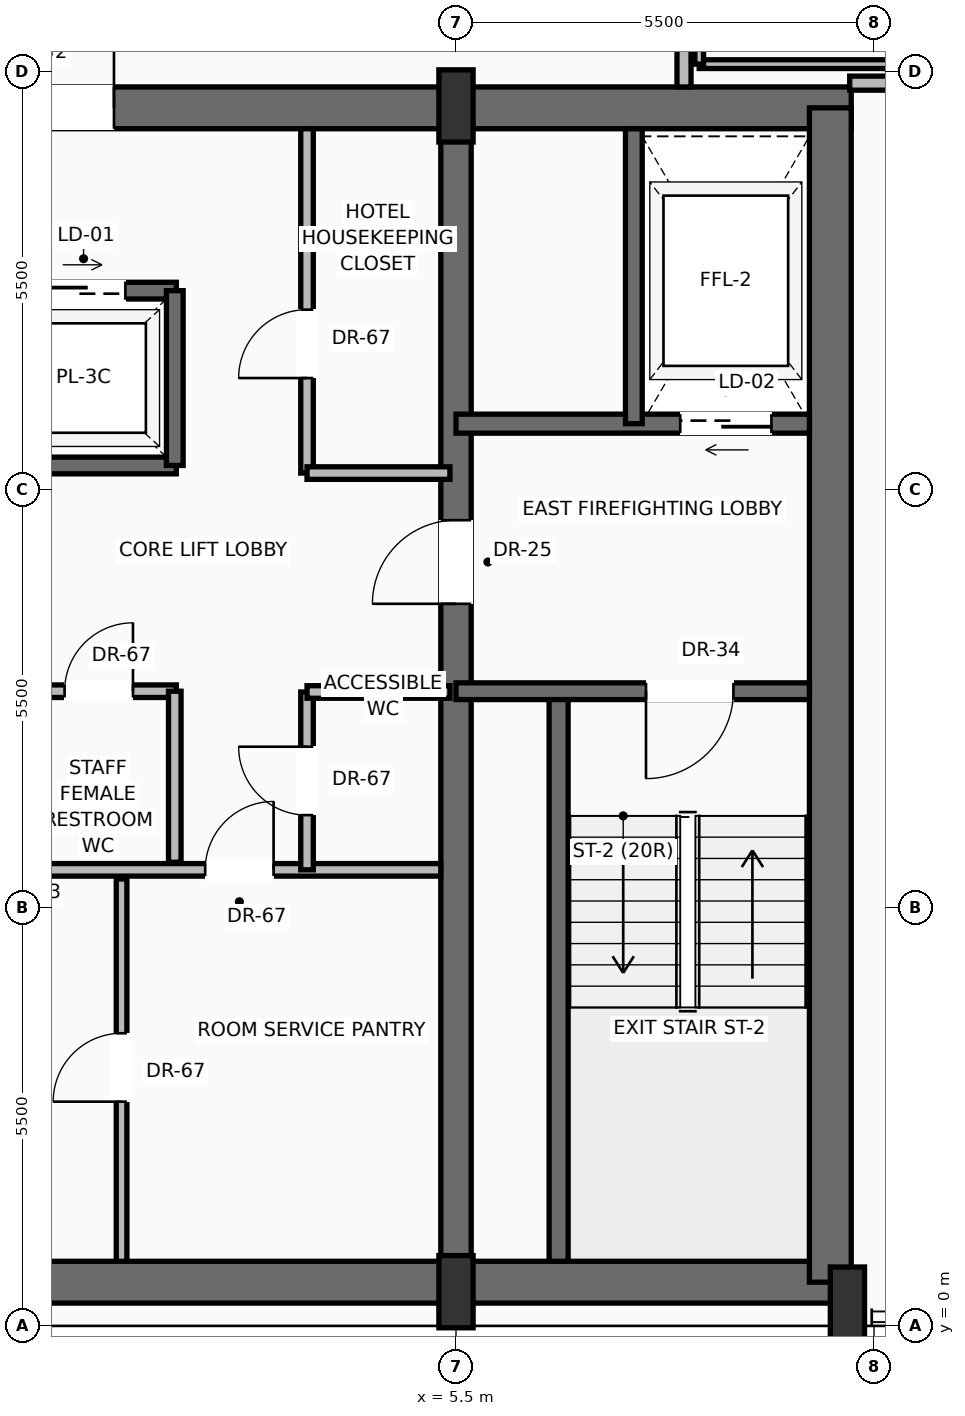
"""IFC4 building model, lengths in metres.
Left out: names, types, materials, properties, quantities, classifications, styles, units other than length and angle.
Written with IfcOpenShell. Run it as: python <this file> out.ifc"""

import sys

from ifc_helpers import new_model, si_unit, direction, frame, frame_2d, origin, origin_2d, place, context, subcontext, project, spatial, rectangle, extrude, source, transform, mapped, element, fill, save


model = new_model("IFC4")
c1 = context("Model", 3, precision=1e-05, world=origin(), true_north=direction((0.0, 1.0)))
c2 = subcontext(c1, "Body", "Model", "MODEL_VIEW")
j1 = project(units=[si_unit("LENGTHUNIT", "METRE"), si_unit("PLANEANGLEUNIT", "RADIAN")], contexts=[c1])
p1 = place(None, origin())
s1 = spatial("IfcSite", under=j1, at=p1, CompositionType="ELEMENT")
p2 = place(p1, origin())
s2 = spatial("IfcBuilding", under=s1, at=p2, CompositionType="ELEMENT")
p3 = place(p2, frame((0.0, 0.0, 223.45)))
s3 = spatial("IfcBuildingStorey", under=s2, at=p3, CompositionType="ELEMENT", Elevation=223.45)
p4 = place(p3, frame((-10.65, 0.575, 0.0), z_axis=(0.0, 0.0, 1.0), x_axis=(1.0, 0.0, 0.0)))
e1 = element("IfcWall", 1, at=p4, inside=s3, PredefinedType="SHEAR", context=c2, shape_type="SweptSolid", body=[
    extrude(rectangle(XDim=21.3, YDim=0.55, at=frame_2d((10.65, 0.0))), origin(), (0.0, 0.0, 1.0), 3.24),
])
p5 = place(p3, frame((-10.7, 16.025, 0.0), z_axis=(0.0, 0.0, 1.0), x_axis=(1.0, 0.0, 0.0)))
e2 = element("IfcWall", 2, at=p5, inside=s3, PredefinedType="SHEAR", context=c2, shape_type="SweptSolid", body=[
    extrude(rectangle(XDim=21.4, YDim=0.55, at=frame_2d((10.7, 0.0))), origin(), (0.0, 0.0, 1.0), 3.24),
])
p6 = place(p5, frame((3.27, 0.0, 0.0)))
e3 = element("IfcOpeningElement", 3, at=p6, cuts=e2, PredefinedType="OPENING", context=c2, shape_type="SweptSolid", body=[
    extrude(rectangle(XDim=1.3, YDim=2.3, at=frame_2d((0.65, 1.15))), frame((0.0, 0.285, 0.0), z_axis=(0.0, -1.0, 0.0), x_axis=(1.0, 0.0, 0.0)), (0.0, 0.0, 1.0), 0.57),
])
p7 = place(p5, frame((9.7, 0.0, 0.0)))
e4 = element("IfcOpeningElement", 4, at=p7, cuts=e2, PredefinedType="OPENING", context=c2, shape_type="SweptSolid", body=[
    extrude(rectangle(XDim=2.0, YDim=2.4, at=frame_2d((1.0, 1.2))), frame((0.0, 0.285, 0.0), z_axis=(0.0, -1.0, 0.0), x_axis=(1.0, 0.0, 0.0)), (0.0, 0.0, 1.0), 0.57),
])
p8 = place(p3, frame((10.425, 0.575, 0.0), z_axis=(0.0, 0.0, 1.0), x_axis=(0.0, 1.0, 0.0)))
e5 = element("IfcWall", 5, at=p8, inside=s3, PredefinedType="SHEAR", context=c2, shape_type="SweptSolid", body=[
    extrude(rectangle(XDim=15.45, YDim=0.55, at=frame_2d((7.725, 0.0))), origin(), (0.0, 0.0, 1.0), 3.24),
])
p9 = place(p3, frame((5.5, 0.575, 0.0), z_axis=(0.0, 0.0, 1.0), x_axis=(0.0, 1.0, 0.0)))
e6 = element("IfcWall", 6, at=p9, inside=s3, PredefinedType="SHEAR", context=c2, shape_type="SweptSolid", body=[
    extrude(rectangle(XDim=15.45, YDim=0.4, at=frame_2d((7.725, 0.0))), origin(), (0.0, 0.0, 1.0), 3.24),
])
p10 = place(p9, frame((8.925, 0.0, 0.0)))
e7 = element("IfcOpeningElement", 7, at=p10, cuts=e6, PredefinedType="OPENING", context=c2, shape_type="SweptSolid", body=[
    extrude(rectangle(XDim=1.1, YDim=2.2, at=frame_2d((0.55, 1.1))), frame((0.0, 0.21, 0.0), z_axis=(0.0, -1.0, 0.0), x_axis=(1.0, 0.0, 0.0)), (0.0, 0.0, 1.0), 0.42),
])
m1 = source(origin(), c2, "Body", "SweptSolid", [
    extrude(rectangle(XDim=0.45, YDim=0.95, at=origin_2d()), origin(), (0.0, 0.0, 1.0), 3.45),
])
for number, where, z_axis, x_axis in (
    (8, (5.5, 0.45, 0.0), (0.0, 0.0, 1.0), (1.0, 0.0, 0.0)),
    (9, (10.65, 0.3, 0.0), (0.0, 0.0, 1.0), (1.0, 0.0, 0.0)),
    (10, (5.5, 16.05, 0.0), (0.0, 0.0, 1.0), (1.0, 0.0, 0.0)),
):
    element("IfcColumn", number, at=place(p3, frame(where, z_axis=z_axis, x_axis=x_axis)), inside=s3, PredefinedType="PILASTER", context=c2, shape_type="MappedRepresentation", body=[
        mapped(m1, transform((0.0, 0.0, 0.0), scale=1.0)),
    ])
p11 = place(p3, frame((8.883, 32.178, 0.0), z_axis=(0.0, 0.0, 1.0), x_axis=(0.529719957473, -0.848172604282, 0.0)))
e11 = element("IfcWall", 11, at=p11, inside=s3, PredefinedType="SOLIDWALL", context=c2, shape_type="SweptSolid", body=[
    extrude(rectangle(XDim=19.431, YDim=0.28, at=frame_2d((9.716, 0.0))), origin(), (0.0, 0.0, 1.0), 2.82),
])
p12 = place(p11, frame((4.664, 0.0, 0.0)))
e12 = element("IfcOpeningElement", 12, at=p12, cuts=e11, PredefinedType="OPENING", context=c2, shape_type="SweptSolid", body=[
    extrude(rectangle(XDim=1.6, YDim=2.35, at=frame_2d((0.8, 1.175))), frame((0.0, 0.15, 0.0), z_axis=(0.0, -1.0, 0.0), x_axis=(1.0, 0.0, 0.0)), (0.0, 0.0, 1.0), 0.3),
])
p13 = place(p11, frame((13.213, 0.0, 0.9)))
e13 = element("IfcOpeningElement", 13, at=p13, cuts=e11, PredefinedType="OPENING", context=c2, shape_type="SweptSolid", body=[
    extrude(rectangle(XDim=1.55, YDim=1.75, at=frame_2d((0.775, 0.875))), frame((0.0, 0.15, 0.0), z_axis=(0.0, -1.0, 0.0), x_axis=(1.0, 0.0, 0.0)), (0.0, 0.0, 1.0), 0.3),
])
p14 = place(p3, frame((6.85, 0.85, 0.0), z_axis=(0.0, 0.0, 1.0), x_axis=(0.0, 1.0, 0.0)))
e14 = element("IfcWall", 14, at=p14, inside=s3, PredefinedType="SOLIDWALL", context=c2, shape_type="SweptSolid", body=[
    extrude(rectangle(XDim=7.5, YDim=0.25, at=frame_2d((3.75, 0.0))), origin(), (0.0, 0.0, 1.0), 3.24),
])
p15 = place(p3, frame((10.15, 8.35, 0.0), z_axis=(0.0, 0.0, 1.0), x_axis=(-1.0, 0.0, 0.0)))
e15 = element("IfcWall", 15, at=p15, inside=s3, PredefinedType="SOLIDWALL", context=c2, shape_type="SweptSolid", body=[
    extrude(rectangle(XDim=4.65, YDim=0.22, at=frame_2d((2.325, 0.0))), origin(), (0.0, 0.0, 1.0), 3.24),
])
p16 = place(p15, frame((1.0, 0.0, 0.0)))
e16 = element("IfcOpeningElement", 16, at=p16, cuts=e15, PredefinedType="OPENING", context=c2, shape_type="SweptSolid", body=[
    extrude(rectangle(XDim=1.15, YDim=2.2, at=frame_2d((0.575, 1.1))), frame((0.0, 0.12, 0.0), z_axis=(0.0, -1.0, 0.0), x_axis=(1.0, 0.0, 0.0)), (0.0, 0.0, 1.0), 0.24),
])
p17 = place(p3, frame((10.15, 11.87, 0.0), z_axis=(0.0, 0.0, 1.0), x_axis=(-1.0, 0.0, 0.0)))
e17 = element("IfcWall", 17, at=p17, inside=s3, PredefinedType="SOLIDWALL", context=c2, shape_type="SweptSolid", body=[
    extrude(rectangle(XDim=4.65, YDim=0.25, at=frame_2d((2.325, 0.0))), origin(), (0.0, 0.0, 1.0), 3.24),
])
p18 = place(p17, frame((0.5, 0.0, 0.0)))
e18 = element("IfcOpeningElement", 18, at=p18, cuts=e17, PredefinedType="OPENING", context=c2, shape_type="SweptSolid", body=[
    extrude(rectangle(XDim=1.2, YDim=2.25, at=frame_2d((0.6, 1.125))), frame((0.0, 0.135, 0.0), z_axis=(0.0, -1.0, 0.0), x_axis=(1.0, 0.0, 0.0)), (0.0, 0.0, 1.0), 0.27),
])
p19 = place(p3, frame((7.84, 11.87, 0.0), z_axis=(0.0, 0.0, 1.0), x_axis=(0.0, 1.0, 0.0)))
e19 = element("IfcWall", 19, at=p19, inside=s3, PredefinedType="SOLIDWALL", context=c2, shape_type="SweptSolid", body=[
    extrude(rectangle(XDim=3.88, YDim=0.22, at=frame_2d((1.94, 0.0))), origin(), (0.0, 0.0, 1.0), 3.24),
])
p20 = place(p3, frame((-5.5, 6.0, 0.0), z_axis=(0.0, 0.0, 1.0), x_axis=(1.0, 0.0, 0.0)))
e20 = element("IfcWall", 20, at=p20, inside=s3, PredefinedType="PARTITIONING", context=c2, shape_type="SweptSolid", body=[
    extrude(rectangle(XDim=10.8, YDim=0.165, at=frame_2d((5.4, 0.0))), origin(), (0.0, 0.0, 1.0), 3.232),
])
p21 = place(p20, frame((7.7, 0.0, 0.0)))
e21 = element("IfcOpeningElement", 21, at=p21, cuts=e20, PredefinedType="OPENING", context=c2, shape_type="SweptSolid", body=[
    extrude(rectangle(XDim=0.9, YDim=2.1, at=frame_2d((0.45, 1.05))), frame((0.0, 0.093, 0.0), z_axis=(0.0, -1.0, 0.0), x_axis=(1.0, 0.0, 0.0)), (0.0, 0.0, 1.0), 0.185),
])
p22 = place(p3, frame((1.1, 0.85, 0.0), z_axis=(0.0, 0.0, 1.0), x_axis=(0.0, 1.0, 0.0)))
e22 = element("IfcWall", 22, at=p22, inside=s3, PredefinedType="PARTITIONING", context=c2, shape_type="SweptSolid", body=[
    extrude(rectangle(XDim=5.03, YDim=0.14, at=frame_2d((2.515, 0.0))), origin(), (0.0, 0.0, 1.0), 3.232),
])
p23 = place(p22, frame((2.1, 0.0, 0.0)))
e23 = element("IfcOpeningElement", 23, at=p23, cuts=e22, PredefinedType="OPENING", context=c2, shape_type="SweptSolid", body=[
    extrude(rectangle(XDim=0.9, YDim=2.1, at=frame_2d((0.45, 1.05))), frame((0.0, 0.08, 0.0), z_axis=(0.0, -1.0, 0.0), x_axis=(1.0, 0.0, 0.0)), (0.0, 0.0, 1.0), 0.16),
])
p24 = place(p3, frame((3.54, 6.0, 0.0), z_axis=(0.0, 0.0, 1.0), x_axis=(0.0, 1.0, 0.0)))
e24 = element("IfcWall", 24, at=p24, inside=s3, PredefinedType="PARTITIONING", context=c2, shape_type="SweptSolid", body=[
    extrude(rectangle(XDim=2.34, YDim=0.165, at=frame_2d((1.17, 0.0))), origin(), (0.0, 0.0, 1.0), 3.232),
])
p25 = place(p24, frame((0.72, 0.0, 0.0)))
e25 = element("IfcOpeningElement", 25, at=p25, cuts=e24, PredefinedType="OPENING", context=c2, shape_type="SweptSolid", body=[
    extrude(rectangle(XDim=0.9, YDim=2.1, at=frame_2d((0.45, 1.05))), frame((0.0, 0.093, 0.0), z_axis=(0.0, -1.0, 0.0), x_axis=(1.0, 0.0, 0.0)), (0.0, 0.0, 1.0), 0.185),
])
p26 = place(p3, frame((3.54, 8.34, 0.0), z_axis=(0.0, 0.0, 1.0), x_axis=(1.0, 0.0, 0.0)))
e26 = element("IfcWall", 26, at=p26, inside=s3, PredefinedType="PARTITIONING", context=c2, shape_type="SweptSolid", body=[
    extrude(rectangle(XDim=1.88, YDim=0.165, at=frame_2d((0.94, 0.0))), origin(), (0.0, 0.0, 1.0), 3.232),
])
p27 = place(p3, frame((-5.3, 8.35, 0.0), z_axis=(0.0, 0.0, 1.0), x_axis=(1.0, 0.0, 0.0)))
e27 = element("IfcWall", 27, at=p27, inside=s3, PredefinedType="PARTITIONING", context=c2, shape_type="SweptSolid", body=[
    extrude(rectangle(XDim=7.12, YDim=0.165, at=frame_2d((3.56, 0.0))), origin(), (0.0, 0.0, 1.0), 3.232),
])
p28 = place(p27, frame((0.85, 0.0, 0.0)))
e28 = element("IfcOpeningElement", 28, at=p28, cuts=e27, PredefinedType="OPENING", context=c2, shape_type="SweptSolid", body=[
    extrude(rectangle(XDim=0.9, YDim=2.1, at=frame_2d((0.45, 1.05))), frame((0.0, 0.093, 0.0), z_axis=(0.0, -1.0, 0.0), x_axis=(1.0, 0.0, 0.0)), (0.0, 0.0, 1.0), 0.185),
])
p29 = place(p27, frame((5.65, 0.0, 0.0)))
e29 = element("IfcOpeningElement", 29, at=p29, cuts=e27, PredefinedType="OPENING", context=c2, shape_type="SweptSolid", body=[
    extrude(rectangle(XDim=0.9, YDim=2.1, at=frame_2d((0.45, 1.05))), frame((0.0, 0.093, 0.0), z_axis=(0.0, -1.0, 0.0), x_axis=(1.0, 0.0, 0.0)), (0.0, 0.0, 1.0), 0.185),
])
p30 = place(p3, frame((1.8, 6.1, 0.0), z_axis=(0.0, 0.0, 1.0), x_axis=(0.0, 1.0, 0.0)))
e30 = element("IfcWall", 30, at=p30, inside=s3, PredefinedType="PARTITIONING", context=c2, shape_type="SweptSolid", body=[
    extrude(rectangle(XDim=2.25, YDim=0.165, at=frame_2d((1.125, 0.0))), origin(), (0.0, 0.0, 1.0), 3.232),
])
p31 = place(p3, frame((-5.5, 11.32, 0.0), z_axis=(0.0, 0.0, 1.0), x_axis=(1.0, 0.0, 0.0)))
e31 = element("IfcWall", 31, at=p31, inside=s3, PredefinedType="SOLIDWALL", context=c2, shape_type="SweptSolid", body=[
    extrude(rectangle(XDim=7.32, YDim=0.22, at=frame_2d((3.66, 0.0))), origin(), (0.0, 0.0, 1.0), 3.24),
])
p32 = place(p3, frame((-5.5, 13.62, 0.0), z_axis=(0.0, 0.0, 1.0), x_axis=(1.0, 0.0, 0.0)))
e32 = element("IfcWall", 32, at=p32, inside=s3, PredefinedType="SOLIDWALL", context=c2, shape_type="SweptSolid", body=[
    extrude(rectangle(XDim=7.32, YDim=0.22, at=frame_2d((3.66, 0.0))), origin(), (0.0, 0.0, 1.0), 3.24),
])
p33 = place(p32, frame((0.75, 0.0, 0.0)))
e33 = element("IfcOpeningElement", 33, at=p33, cuts=e32, PredefinedType="OPENING", context=c2, shape_type="SweptSolid", body=[
    extrude(rectangle(XDim=1.1, YDim=2.2, at=frame_2d((0.55, 1.1))), frame((0.0, 0.12, 0.0), z_axis=(0.0, -1.0, 0.0), x_axis=(1.0, 0.0, 0.0)), (0.0, 0.0, 1.0), 0.24),
])
p34 = place(p32, frame((3.15, 0.0, 0.0)))
e34 = element("IfcOpeningElement", 34, at=p34, cuts=e32, PredefinedType="OPENING", context=c2, shape_type="SweptSolid", body=[
    extrude(rectangle(XDim=1.1, YDim=2.2, at=frame_2d((0.55, 1.1))), frame((0.0, 0.12, 0.0), z_axis=(0.0, -1.0, 0.0), x_axis=(1.0, 0.0, 0.0)), (0.0, 0.0, 1.0), 0.24),
])
p35 = place(p32, frame((5.55, 0.0, 0.0)))
e35 = element("IfcOpeningElement", 35, at=p35, cuts=e32, PredefinedType="OPENING", context=c2, shape_type="SweptSolid", body=[
    extrude(rectangle(XDim=1.1, YDim=2.2, at=frame_2d((0.55, 1.1))), frame((0.0, 0.12, 0.0), z_axis=(0.0, -1.0, 0.0), x_axis=(1.0, 0.0, 0.0)), (0.0, 0.0, 1.0), 0.24),
])
p36 = place(p3, frame((1.8, 11.32, 0.0), z_axis=(0.0, 0.0, 1.0), x_axis=(0.0, 1.0, 0.0)))
e36 = element("IfcWall", 36, at=p36, inside=s3, PredefinedType="SOLIDWALL", context=c2, shape_type="SweptSolid", body=[
    extrude(rectangle(XDim=2.3, YDim=0.22, at=frame_2d((1.15, 0.0))), origin(), (0.0, 0.0, 1.0), 3.24),
])
p37 = place(p3, frame((3.54, 11.22, 0.0), z_axis=(0.0, 0.0, 1.0), x_axis=(0.0, 1.0, 0.0)))
e37 = element("IfcWall", 37, at=p37, inside=s3, PredefinedType="PARTITIONING", context=c2, shape_type="SweptSolid", body=[
    extrude(rectangle(XDim=4.53, YDim=0.165, at=frame_2d((2.265, 0.0))), origin(), (0.0, 0.0, 1.0), 3.232),
])
p38 = place(p37, frame((1.25, 0.0, 0.0)))
e38 = element("IfcOpeningElement", 38, at=p38, cuts=e37, PredefinedType="OPENING", context=c2, shape_type="SweptSolid", body=[
    extrude(rectangle(XDim=0.9, YDim=2.1, at=frame_2d((0.45, 1.05))), frame((0.0, 0.093, 0.0), z_axis=(0.0, -1.0, 0.0), x_axis=(1.0, 0.0, 0.0)), (0.0, 0.0, 1.0), 0.185),
])
p39 = place(p3, frame((3.54, 11.22, 0.0), z_axis=(0.0, 0.0, 1.0), x_axis=(1.0, 0.0, 0.0)))
e39 = element("IfcWall", 39, at=p39, inside=s3, PredefinedType="PARTITIONING", context=c2, shape_type="SweptSolid", body=[
    extrude(rectangle(XDim=1.88, YDim=0.165, at=frame_2d((0.94, 0.0))), origin(), (0.0, 0.0, 1.0), 3.232),
])
p40 = place(p3, frame((8.5, 16.3, 0.0), z_axis=(0.0, 0.0, 1.0), x_axis=(0.0, 1.0, 0.0)))
e40 = element("IfcWall", 40, at=p40, inside=s3, PredefinedType="PARTITIONING", context=c2, shape_type="SweptSolid", body=[
    extrude(rectangle(XDim=13.3, YDim=0.185, at=frame_2d((6.65, 0.0))), origin(), (0.0, 0.0, 1.0), 3.232),
])
p41 = place(p40, frame((3.136, 0.0, 0.0)))
e41 = element("IfcOpeningElement", 41, at=p41, cuts=e40, PredefinedType="OPENING", context=c2, shape_type="SweptSolid", body=[
    extrude(rectangle(XDim=1.05, YDim=2.25, at=frame_2d((0.525, 1.125))), frame((0.0, 0.103, 0.0), z_axis=(0.0, -1.0, 0.0), x_axis=(1.0, 0.0, 0.0)), (0.0, 0.0, 1.0), 0.205),
])
p42 = place(p40, frame((9.636, 0.0, 0.0)))
e42 = element("IfcOpeningElement", 42, at=p42, cuts=e40, PredefinedType="OPENING", context=c2, shape_type="SweptSolid", body=[
    extrude(rectangle(XDim=1.05, YDim=2.25, at=frame_2d((0.525, 1.125))), frame((0.0, 0.103, 0.0), z_axis=(0.0, -1.0, 0.0), x_axis=(1.0, 0.0, 0.0)), (0.0, 0.0, 1.0), 0.205),
])
p43 = place(p3, frame((10.68, 16.35, 0.0), z_axis=(0.0, 0.0, 1.0), x_axis=(1.0, 0.0, 0.0)))
e43 = element("IfcWall", 43, at=p43, inside=s3, PredefinedType="PARTITIONING", context=c2, shape_type="SweptSolid", body=[
    extrude(rectangle(XDim=8.241, YDim=0.185, at=frame_2d((4.121, 0.0))), origin(), (0.0, 0.0, 1.0), 3.232),
])
p44 = place(p43, frame((2.461, 0.0, 0.0)))
e44 = element("IfcOpeningElement", 44, at=p44, cuts=e43, PredefinedType="OPENING", context=c2, shape_type="SweptSolid", body=[
    extrude(rectangle(XDim=1.05, YDim=2.25, at=frame_2d((0.525, 1.125))), frame((0.0, 0.103, 0.0), z_axis=(0.0, -1.0, 0.0), x_axis=(1.0, 0.0, 0.0)), (0.0, 0.0, 1.0), 0.205),
])
p45 = place(p3, frame((8.7, 16.6, 0.0), z_axis=(0.0, 0.0, 1.0), x_axis=(1.0, 0.0, 0.0)))
e45 = element("IfcWall", 45, at=p45, inside=s3, PredefinedType="PARTITIONING", context=c2, shape_type="SweptSolid", body=[
    extrude(rectangle(XDim=2.65, YDim=0.115, at=frame_2d((1.325, 0.0))), origin(), (0.0, 0.0, 1.0), 3.232),
])
p46 = place(p3, frame((8.7, 16.6, 0.0), z_axis=(0.0, 0.0, 1.0), x_axis=(0.0, 1.0, 0.0)))
e46 = element("IfcWall", 46, at=p46, inside=s3, PredefinedType="PARTITIONING", context=c2, shape_type="SweptSolid", body=[
    extrude(rectangle(XDim=2.4, YDim=0.115, at=frame_2d((1.2, 0.0))), origin(), (0.0, 0.0, 1.0), 3.232),
])
m2 = source(origin(), c2, "Body", "SweptSolid", [
    extrude(rectangle(XDim=1.15, YDim=2.2, at=frame_2d((0.575, 1.1))), frame((0.0, 0.025, 0.0), z_axis=(0.0, -1.0, 0.0), x_axis=(1.0, 0.0, 0.0)), (0.0, 0.0, 1.0), 0.05),
])
p47 = place(p16, origin())
e47 = element("IfcDoor", 47, at=p47, inside=s3, OperationType="SINGLE_SWING_RIGHT", PredefinedType="DOOR", context=c2, shape_type="MappedRepresentation", body=[
    mapped(m2, transform((0.0, 0.0, 0.0), scale=1.0)),
])
fill(e16, e47)
m3 = source(origin(), c2, "Body", "SweptSolid", [
    extrude(rectangle(XDim=1.1, YDim=2.2, at=frame_2d((0.55, 1.1))), frame((0.0, 0.025, 0.0), z_axis=(0.0, -1.0, 0.0), x_axis=(1.0, 0.0, 0.0)), (0.0, 0.0, 1.0), 0.05),
])
p48 = place(p10, origin())
e48 = element("IfcDoor", 48, at=p48, inside=s3, OperationType="SINGLE_SWING_LEFT", PredefinedType="DOOR", context=c2, shape_type="MappedRepresentation", body=[
    mapped(m3, transform((0.0, 0.0, 0.0), scale=1.0)),
])
fill(e7, e48)
m4 = source(origin(), c2, "Body", "SweptSolid", [
    extrude(rectangle(XDim=1.2, YDim=2.25, at=frame_2d((0.6, 1.125))), frame((0.0, 0.025, 0.0), z_axis=(0.0, -1.0, 0.0), x_axis=(1.0, 0.0, 0.0)), (0.0, 0.0, 1.0), 0.05),
])
p49 = place(p18, origin())
e49 = element("IfcDoor", 49, at=p49, inside=s3, OperationType="SLIDING_TO_RIGHT", PredefinedType="DOOR", context=c2, shape_type="MappedRepresentation", body=[
    mapped(m4, transform((0.0, 0.0, 0.0), scale=1.0)),
])
fill(e18, e49)
m5 = source(origin(), c2, "Body", "SweptSolid", [
    extrude(rectangle(XDim=2.0, YDim=2.4, at=frame_2d((1.0, 1.2))), frame((0.0, 0.025, 0.0), z_axis=(0.0, -1.0, 0.0), x_axis=(1.0, 0.0, 0.0)), (0.0, 0.0, 1.0), 0.05),
])
p50 = place(p7, origin())
e50 = element("IfcDoor", 50, at=p50, inside=s3, OperationType="DOUBLE_DOOR_SINGLE_SWING", PredefinedType="DOOR", context=c2, shape_type="MappedRepresentation", body=[
    mapped(m5, transform((0.0, 0.0, 0.0), scale=1.0)),
])
fill(e4, e50)
m6 = source(origin(), c2, "Body", "SweptSolid", [
    extrude(rectangle(XDim=0.9, YDim=2.1, at=frame_2d((0.45, 1.05))), frame((0.0, 0.025, 0.0), z_axis=(0.0, -1.0, 0.0), x_axis=(1.0, 0.0, 0.0)), (0.0, 0.0, 1.0), 0.05),
])
p51 = place(p21, origin())
e51 = element("IfcDoor", 51, at=p51, inside=s3, OperationType="SINGLE_SWING_RIGHT", PredefinedType="DOOR", context=c2, shape_type="MappedRepresentation", body=[
    mapped(m6, transform((0.0, 0.0, 0.0), scale=1.0)),
])
fill(e21, e51)
p52 = place(p23, origin())
e52 = element("IfcDoor", 52, at=p52, inside=s3, OperationType="SINGLE_SWING_LEFT", PredefinedType="DOOR", context=c2, shape_type="MappedRepresentation", body=[
    mapped(m6, transform((0.0, 0.0, 0.0), scale=1.0)),
])
fill(e23, e52)
p53 = place(p25, origin())
e53 = element("IfcDoor", 53, at=p53, inside=s3, OperationType="SINGLE_SWING_RIGHT", PredefinedType="DOOR", context=c2, shape_type="MappedRepresentation", body=[
    mapped(m6, transform((0.0, 0.0, 0.0), scale=1.0)),
])
fill(e25, e53)
p54 = place(p29, origin())
e54 = element("IfcDoor", 54, at=p54, inside=s3, OperationType="SINGLE_SWING_RIGHT", PredefinedType="DOOR", context=c2, shape_type="MappedRepresentation", body=[
    mapped(m6, transform((0.0, 0.0, 0.0), scale=1.0)),
])
fill(e29, e54)
m7 = source(origin(), c2, "Body", "SweptSolid", [
    extrude(rectangle(XDim=1.1, YDim=2.2, at=frame_2d((0.55, 1.1))), frame((0.0, 0.025, 0.0), z_axis=(0.0, -1.0, 0.0), x_axis=(1.0, 0.0, 0.0)), (0.0, 0.0, 1.0), 0.05),
])
p55 = place(p35, origin())
e55 = element("IfcDoor", 55, at=p55, inside=s3, OperationType="SLIDING_TO_RIGHT", PredefinedType="DOOR", context=c2, shape_type="MappedRepresentation", body=[
    mapped(m7, transform((0.0, 0.0, 0.0), scale=1.0)),
])
fill(e35, e55)
p56 = place(p38, origin())
e56 = element("IfcDoor", 56, at=p56, inside=s3, OperationType="SINGLE_SWING_LEFT", PredefinedType="DOOR", context=c2, shape_type="MappedRepresentation", body=[
    mapped(m6, transform((0.0, 0.0, 0.0), scale=1.0)),
])
fill(e38, e56)
save(model, sys.argv[1])
